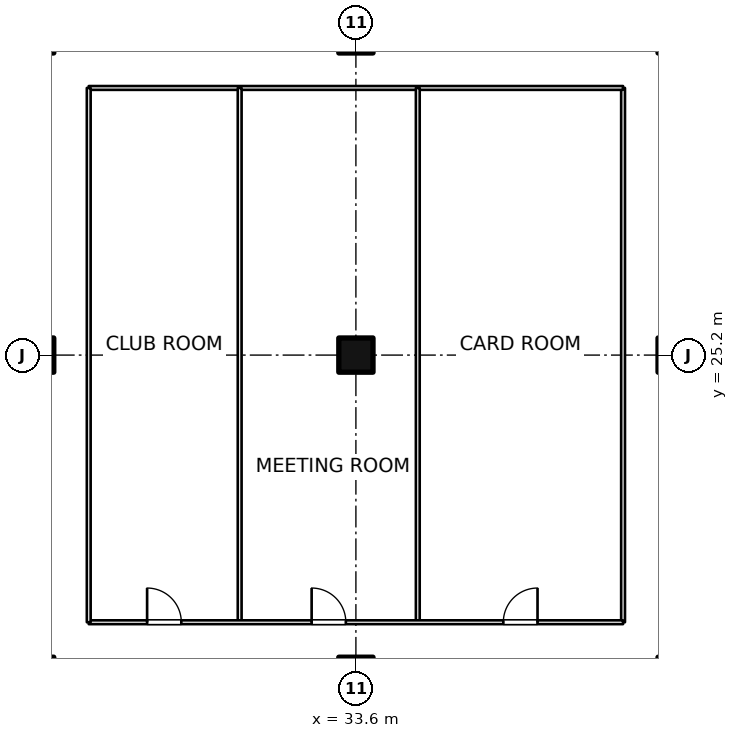
"""IFC4 building model, lengths in metres.
Left out: names, types, materials, properties, quantities, classifications, styles, units other than length and angle.
Written with IfcOpenShell. Run it as: python <this file> out.ifc"""

import sys

from ifc_helpers import new_model, si_unit, direction, frame, frame_2d, origin, origin_2d, place, context, subcontext, project, spatial, rectangle, extrude, element, fill, save


model = new_model("IFC4")
c1 = context("Model", 3, precision=1e-05, world=origin(), true_north=direction((0.0, 1.0)))
c2 = subcontext(c1, "Body", "Model", "MODEL_VIEW")
j1 = project(units=[si_unit("LENGTHUNIT", "METRE"), si_unit("PLANEANGLEUNIT", "RADIAN")], contexts=[c1])
p1 = place(None, origin())
s1 = spatial("IfcSite", under=j1, at=p1, CompositionType="ELEMENT")
p2 = place(p1, origin())
s2 = spatial("IfcBuilding", under=s1, at=p2, CompositionType="ELEMENT")
p3 = place(p2, frame((0.0, 0.0, 6.0)))
s3 = spatial("IfcBuildingStorey", under=s2, at=p3, CompositionType="ELEMENT", Elevation=6.0)
for number, where, z_axis, x_axis in (
    (1, (25.2, 16.8, 0.0), (0.0, 0.0, 1.0), (1.0, 0.0, 0.0)),
    (2, (25.2, 25.2, 0.0), (0.0, 0.0, 1.0), (1.0, 0.0, 0.0)),
    (3, (25.2, 33.6, 0.0), (0.0, 0.0, 1.0), (1.0, 0.0, 0.0)),
    (4, (33.6, 16.8, 0.0), (0.0, 0.0, 1.0), (1.0, 0.0, 0.0)),
    (5, (33.6, 25.2, 0.0), (0.0, 0.0, 1.0), (1.0, 0.0, 0.0)),
    (6, (33.6, 33.6, 0.0), (0.0, 0.0, 1.0), (1.0, 0.0, 0.0)),
    (7, (42.0, 16.8, 0.0), (0.0, 0.0, 1.0), (1.0, 0.0, 0.0)),
    (8, (42.0, 25.2, 0.0), (0.0, 0.0, 1.0), (1.0, 0.0, 0.0)),
    (9, (42.0, 33.6, 0.0), (0.0, 0.0, 1.0), (1.0, 0.0, 0.0)),
):
    element("IfcColumn", number, at=place(p3, frame(where, z_axis=z_axis, x_axis=x_axis)), inside=s3, PredefinedType="COLUMN", context=c2, shape_type="SweptSolid", body=[
        extrude(rectangle(XDim=0.9, YDim=0.9, at=origin_2d()), origin(), (0.0, 0.0, 1.0), 5.0),
    ])
p4 = place(p3, frame((26.57, 18.17, 0.0), z_axis=(0.0, 0.0, 1.0), x_axis=(1.0, 0.0, 0.0)))
e10 = element("IfcWall", 10, at=p4, inside=s3, PredefinedType="PARTITIONING", context=c2, shape_type="SweptSolid", body=[
    extrude(rectangle(XDim=14.06, YDim=0.1, at=frame_2d((7.03, 0.0))), origin(), (0.0, 0.0, 1.0), 4.7),
])
p5 = place(p4, frame((1.536, 0.0, 0.0)))
e11 = element("IfcOpeningElement", 11, at=p5, cuts=e10, PredefinedType="OPENING", context=c2, shape_type="SweptSolid", body=[
    extrude(rectangle(XDim=0.9, YDim=2.1, at=frame_2d((0.45, 1.05))), frame((0.0, 0.06, 0.0), z_axis=(0.0, -1.0, 0.0), x_axis=(1.0, 0.0, 0.0)), (0.0, 0.0, 1.0), 0.12),
])
p6 = place(p4, frame((5.865, 0.0, 0.0)))
e12 = element("IfcOpeningElement", 12, at=p6, cuts=e10, PredefinedType="OPENING", context=c2, shape_type="SweptSolid", body=[
    extrude(rectangle(XDim=0.9, YDim=2.1, at=frame_2d((0.45, 1.05))), frame((0.0, 0.06, 0.0), z_axis=(0.0, -1.0, 0.0), x_axis=(1.0, 0.0, 0.0)), (0.0, 0.0, 1.0), 0.12),
])
p7 = place(p4, frame((10.909, 0.0, 0.0)))
e13 = element("IfcOpeningElement", 13, at=p7, cuts=e10, PredefinedType="OPENING", context=c2, shape_type="SweptSolid", body=[
    extrude(rectangle(XDim=0.9, YDim=2.1, at=frame_2d((0.45, 1.05))), frame((0.0, 0.06, 0.0), z_axis=(0.0, -1.0, 0.0), x_axis=(1.0, 0.0, 0.0)), (0.0, 0.0, 1.0), 0.12),
])
p8 = place(p3, frame((40.63, 18.17, 0.0), z_axis=(0.0, 0.0, 1.0), x_axis=(0.0, 1.0, 0.0)))
e14 = element("IfcWall", 14, at=p8, inside=s3, PredefinedType="PARTITIONING", context=c2, shape_type="SweptSolid", body=[
    extrude(rectangle(XDim=14.06, YDim=0.1, at=frame_2d((7.03, 0.0))), origin(), (0.0, 0.0, 1.0), 4.7),
])
p9 = place(p3, frame((40.63, 32.23, 0.0), z_axis=(0.0, 0.0, 1.0), x_axis=(-1.0, 0.0, 0.0)))
e15 = element("IfcWall", 15, at=p9, inside=s3, PredefinedType="PARTITIONING", context=c2, shape_type="SweptSolid", body=[
    extrude(rectangle(XDim=14.06, YDim=0.1, at=frame_2d((7.03, 0.0))), origin(), (0.0, 0.0, 1.0), 4.7),
])
for number, where, z_axis, x_axis in (
    (16, (26.57, 32.23, 0.0), (0.0, 0.0, 1.0), (0.0, -1.0, 0.0)),
    (17, (30.542, 18.17, 0.0), (0.0, 0.0, 1.0), (0.0, 1.0, 0.0)),
    (18, (35.229, 18.17, 0.0), (0.0, 0.0, 1.0), (0.0, 1.0, 0.0)),
):
    element("IfcWall", number, at=place(p3, frame(where, z_axis=z_axis, x_axis=x_axis)), inside=s3, PredefinedType="PARTITIONING", context=c2, shape_type="SweptSolid", body=[
        extrude(rectangle(XDim=14.06, YDim=0.1, at=frame_2d((7.03, 0.0))), origin(), (0.0, 0.0, 1.0), 4.7),
    ])
p10 = place(p5, origin())
e19 = element("IfcDoor", 19, at=p10, inside=s3, OperationType="SINGLE_SWING_LEFT", PredefinedType="DOOR", context=c2, shape_type="SweptSolid", body=[
    extrude(rectangle(XDim=0.9, YDim=2.1, at=frame_2d((0.45, 1.05))), frame((0.0, 0.025, 0.0), z_axis=(0.0, -1.0, 0.0), x_axis=(1.0, 0.0, 0.0)), (0.0, 0.0, 1.0), 0.05),
])
fill(e11, e19)
p11 = place(p6, origin())
e20 = element("IfcDoor", 20, at=p11, inside=s3, OperationType="SINGLE_SWING_LEFT", PredefinedType="DOOR", context=c2, shape_type="SweptSolid", body=[
    extrude(rectangle(XDim=0.9, YDim=2.1, at=frame_2d((0.45, 1.05))), frame((0.0, 0.025, 0.0), z_axis=(0.0, -1.0, 0.0), x_axis=(1.0, 0.0, 0.0)), (0.0, 0.0, 1.0), 0.05),
])
fill(e12, e20)
p12 = place(p7, origin())
e21 = element("IfcDoor", 21, at=p12, inside=s3, OperationType="SINGLE_SWING_RIGHT", PredefinedType="DOOR", context=c2, shape_type="SweptSolid", body=[
    extrude(rectangle(XDim=0.9, YDim=2.1, at=frame_2d((0.45, 1.05))), frame((0.0, 0.025, 0.0), z_axis=(0.0, -1.0, 0.0), x_axis=(1.0, 0.0, 0.0)), (0.0, 0.0, 1.0), 0.05),
])
fill(e13, e21)
save(model, sys.argv[1])
